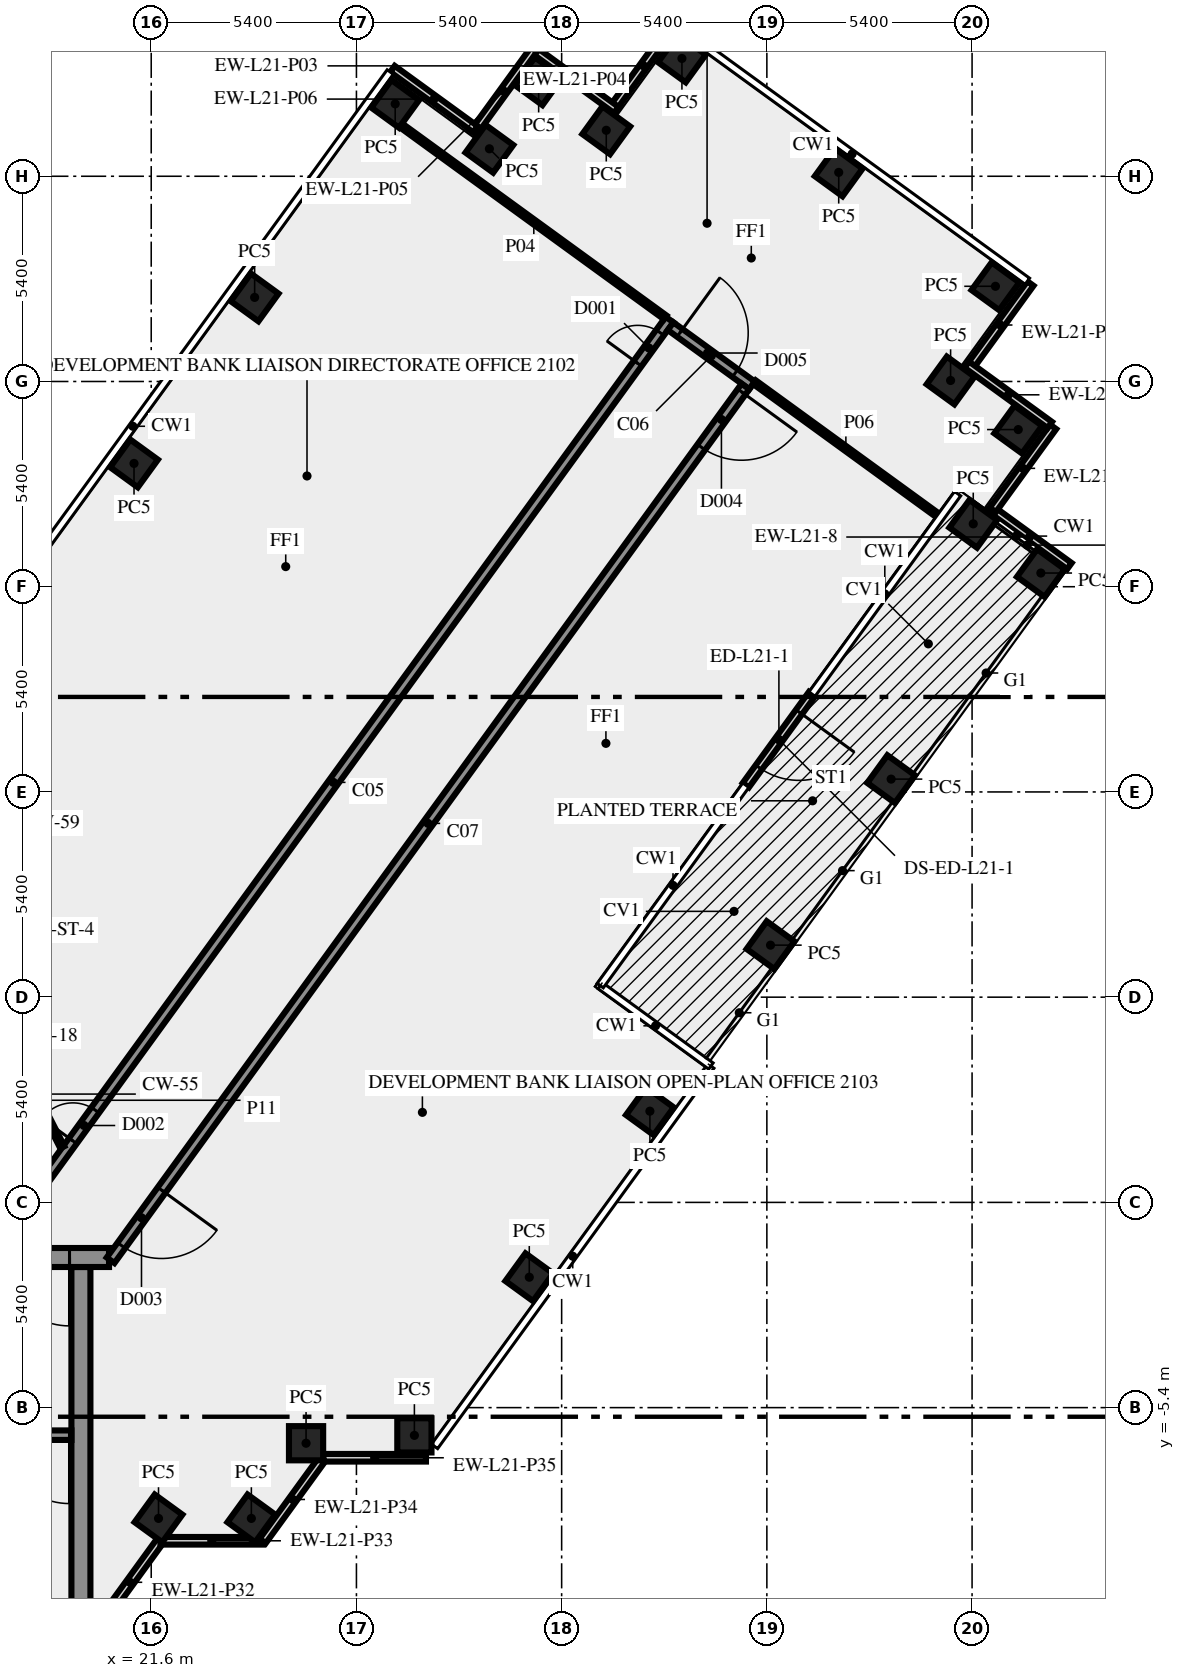
"""IFC4 building model, lengths in metres.
Left out: names, types, materials, properties, quantities, classifications, styles, units other than length and angle.
Written with IfcOpenShell. Run it as: python <this file> out.ifc"""

import sys

from ifc_helpers import new_model, si_unit, direction, frame, frame_2d, origin, origin_2d, place, context, subcontext, project, spatial, rectangle, extrude, element, fill, save


model = new_model("IFC4")
c1 = context("Model", 3, precision=1e-05, world=origin(), true_north=direction((0.0, 1.0)))
c2 = subcontext(c1, "Body", "Model", "MODEL_VIEW")
j1 = project(units=[si_unit("LENGTHUNIT", "METRE"), si_unit("PLANEANGLEUNIT", "RADIAN")], contexts=[c1])
p1 = place(None, origin())
s1 = spatial("IfcSite", under=j1, at=p1, CompositionType="ELEMENT")
p2 = place(p1, origin())
s2 = spatial("IfcBuilding", under=s1, at=p2, CompositionType="ELEMENT")
p3 = place(p2, frame((0.0, 0.0, 93.0)))
s3 = spatial("IfcBuildingStorey", under=s2, at=p3, CompositionType="ELEMENT", Elevation=93.0)
for number, where, z_axis, x_axis in (
    (1, (21.792, -8.315, 0.0), (0.0, 0.0, 1.0), (0.588, 0.809, 0.0)),
    (2, (24.235, -8.315, 0.0), (0.0, 0.0, 1.0), (0.588, 0.809, 0.0)),
    (3, (25.674, -6.337, 0.0), (0.0, 0.0, 1.0), (1.0, 0.0, 0.0)),
    (4, (28.525, -6.13, 0.0), (0.0, 0.0, 1.0), (1.0, 0.0, 0.0)),
    (5, (31.548, -1.969, 0.0), (0.0, 0.0, 1.0), (0.588, 0.809, 0.0)),
    (6, (34.722, 2.4, 0.0), (0.0, 0.0, 1.0), (0.588, 0.809, 0.0)),
    (7, (37.896, 6.769, 0.0), (0.0, 0.0, 1.0), (0.588, 0.809, 0.0)),
    (8, (41.07, 11.137, 0.0), (0.0, 0.0, 1.0), (0.588, 0.809, 0.0)),
    (9, (45.01, 16.56, 0.0), (0.0, 0.0, 1.0), (0.588, 0.809, 0.0)),
    (10, (43.231, 17.854, 0.0), (0.0, 0.0, 1.0), (0.588, 0.809, 0.0)),
    (11, (44.415, 20.335, 0.0), (0.0, 0.0, 1.0), (0.588, 0.809, 0.0)),
    (12, (42.635, 21.626, 0.0), (0.0, 0.0, 1.0), (-0.809, 0.588, 0.0)),
    (13, (43.815, 24.105, 0.0), (0.0, 0.0, 1.0), (-0.809, 0.588, 0.0)),
    (14, (39.691, 27.102, 0.0), (0.0, 0.0, 1.0), (-0.809, 0.588, 0.0)),
    (15, (35.565, 30.1, 0.0), (0.0, 0.0, 1.0), (-0.588, -0.809, 0.0)),
    (16, (33.574, 28.209, 0.0), (0.0, 0.0, 1.0), (-0.809, 0.588, 0.0)),
    (17, (31.795, 29.5, 0.0), (0.0, 0.0, 1.0), (-0.588, -0.809, 0.0)),
    (18, (30.499, 27.723, 0.0), (0.0, 0.0, 1.0), (-0.809, 0.588, 0.0)),
    (19, (28.02, 28.905, 0.0), (0.0, 0.0, 1.0), (-0.809, 0.588, 0.0)),
    (20, (24.321, 23.812, 0.0), (0.0, 0.0, 1.0), (-0.588, -0.809, 0.0)),
    (21, (21.147, 19.444, 0.0), (0.0, 0.0, 1.0), (-0.588, -0.809, 0.0)),
):
    element("IfcColumn", number, at=place(p3, frame(where, z_axis=z_axis, x_axis=x_axis)), inside=s3, PredefinedType="COLUMN", context=c2, shape_type="SweptSolid", body=[
        extrude(rectangle(XDim=0.9, YDim=0.9, at=origin_2d()), origin(), (0.0, 0.0, 1.0), 3.65),
    ])
for number, where, z_axis, x_axis in (
    (22, (43.149, 21.994, 0.0), (0.0, 0.0, 1.0), (0.588, 0.809, 0.0)),
    (23, (35.351, 30.997, 0.0), (0.0, 0.0, 1.0), (-0.588, -0.809, 0.0)),
    (24, (33.838, 28.744, 0.0), (0.0, 0.0, 1.0), (-0.809, 0.588, 0.0)),
    (25, (31.67, 30.333, 0.0), (0.0, 0.0, 1.0), (-0.588, -0.809, 0.0)),
    (26, (30.133, 28.237, 0.0), (0.0, 0.0, 1.0), (-0.809, 0.588, 0.0)),
):
    element("IfcWall", number, at=place(p3, frame(where, z_axis=z_axis, x_axis=x_axis)), inside=s3, PredefinedType="SOLIDWALL", context=c2, shape_type="SweptSolid", body=[
        extrude(rectangle(XDim=2.7, YDim=0.2, at=frame_2d((1.35, 0.0))), origin(), (0.0, 0.0, 1.0), 3.65),
    ])
p4 = place(p3, frame((20.253, -11.083, 0.0), z_axis=(0.0, 0.0, 1.0), x_axis=(0.587766567315, 0.809030569476, 0.0)))
e27 = element("IfcWall", 27, at=p4, inside=s3, PredefinedType="SOLIDWALL", context=c2, shape_type="SweptSolid", body=[
    extrude(rectangle(XDim=2.688, YDim=0.2, at=frame_2d((1.344, 0.0))), origin(), (0.0, 0.0, 1.0), 3.65),
])
p5 = place(p3, frame((21.843, -8.904, 0.0), z_axis=(0.0, 0.0, 1.0), x_axis=(1.0, 0.0, 0.0)))
e28 = element("IfcWall", 28, at=p5, inside=s3, PredefinedType="SOLIDWALL", context=c2, shape_type="SweptSolid", body=[
    extrude(rectangle(XDim=2.7, YDim=0.2, at=frame_2d((1.35, 0.0))), origin(), (0.0, 0.0, 1.0), 3.65),
])
p6 = place(p3, frame((24.533, -8.909, 0.0), z_axis=(0.0, 0.0, 1.0), x_axis=(0.587720002413, 0.809064397168, 0.0)))
e29 = element("IfcWall", 29, at=p6, inside=s3, PredefinedType="SOLIDWALL", context=c2, shape_type="SweptSolid", body=[
    extrude(rectangle(XDim=2.7, YDim=0.2, at=frame_2d((1.35, 0.0))), origin(), (0.0, 0.0, 1.0), 3.65),
])
p7 = place(p3, frame((26.13, -6.719, 0.0), z_axis=(0.0, 0.0, 1.0), x_axis=(1.0, 0.0, 0.0)))
e30 = element("IfcWall", 30, at=p7, inside=s3, PredefinedType="SOLIDWALL", context=c2, shape_type="SweptSolid", body=[
    extrude(rectangle(XDim=2.7, YDim=0.2, at=frame_2d((1.35, 0.0))), origin(), (0.0, 0.0, 1.0), 3.65),
])
p8 = place(p3, frame((38.988, 13.375, 0.0), z_axis=(0.0, 0.0, 1.0), x_axis=(-0.587735577821, -0.809053082661, 0.0)))
e31 = element("IfcWall", 31, at=p8, inside=s3, PredefinedType="SOLIDWALL", context=c2, shape_type="SweptSolid", body=[
    extrude(rectangle(XDim=2.963, YDim=0.2, at=frame_2d((1.481, 0.0))), origin(), (0.0, 0.0, 1.0), 3.65),
])
p9 = place(p8, frame((0.582, 0.0, 0.0)))
e32 = element("IfcOpeningElement", 32, at=p9, cuts=e31, PredefinedType="OPENING", context=c2, shape_type="SweptSolid", body=[
    extrude(rectangle(XDim=1.8, YDim=2.4, at=frame_2d((0.9, 1.2))), frame((0.0, 0.11, 0.0), z_axis=(0.0, -1.0, 0.0), x_axis=(1.0, 0.0, 0.0)), (0.0, 0.0, 1.0), 0.22),
])
p10 = place(p3, frame((45.761, 16.743, 0.0), z_axis=(0.0, 0.0, 1.0), x_axis=(-0.808979656733, 0.587836639716, 0.0)))
e33 = element("IfcWall", 33, at=p10, inside=s3, PredefinedType="SOLIDWALL", context=c2, shape_type="SweptSolid", body=[
    extrude(rectangle(XDim=2.6, YDim=0.2, at=frame_2d((1.3, 0.0))), origin(), (0.0, 0.0, 1.0), 3.65),
])
for number, where, z_axis, x_axis in (
    (34, (43.746, 18.223, 0.0), (0.0, 0.0, 1.0), (0.588, 0.809, 0.0)),
    (35, (45.245, 20.456, 0.0), (0.0, 0.0, 1.0), (-0.809, 0.588, 0.0)),
):
    element("IfcWall", number, at=place(p3, frame(where, z_axis=z_axis, x_axis=x_axis)), inside=s3, PredefinedType="SOLIDWALL", context=c2, shape_type="SweptSolid", body=[
        extrude(rectangle(XDim=2.7, YDim=0.2, at=frame_2d((1.35, 0.0))), origin(), (0.0, 0.0, 1.0), 3.65),
    ])
p11 = place(p3, frame((19.75, -10.5, 0.0), z_axis=(0.0, 0.0, 1.0), x_axis=(0.0, 1.0, 0.0)))
e36 = element("IfcWall", 36, at=p11, inside=s3, PredefinedType="SHEAR", context=c2, shape_type="SweptSolid", body=[
    extrude(rectangle(XDim=8.8, YDim=0.5, at=frame_2d((4.4, 0.0))), origin(), (0.0, 0.0, 1.0), 3.65),
])
p12 = place(p3, frame((19.5, -6.125, 0.0), z_axis=(0.0, 0.0, 1.0), x_axis=(-1.0, 0.0, 0.0)))
e37 = element("IfcWall", 37, at=p12, inside=s3, PredefinedType="SHEAR", context=c2, shape_type="SweptSolid", body=[
    extrude(rectangle(XDim=8.05, YDim=0.25, at=frame_2d((4.025, 0.0))), origin(), (0.0, 0.0, 1.0), 3.65),
])
p13 = place(p12, frame((0.05, 0.0, 0.0)))
e38 = element("IfcOpeningElement", 38, at=p13, cuts=e37, PredefinedType="OPENING", context=c2, shape_type="SweptSolid", body=[
    extrude(rectangle(XDim=1.8, YDim=2.1, at=frame_2d((0.9, 1.05))), frame((0.0, 0.135, 0.0), z_axis=(0.0, -1.0, 0.0), x_axis=(1.0, 0.0, 0.0)), (0.0, 0.0, 1.0), 0.27),
])
p14 = place(p3, frame((20.49, -1.45, 0.0), z_axis=(0.0, 0.0, 1.0), x_axis=(-1.0, 0.0, 0.0)))
e39 = element("IfcWall", 39, at=p14, inside=s3, PredefinedType="SHEAR", context=c2, shape_type="SweptSolid", body=[
    extrude(rectangle(XDim=40.98, YDim=0.5, at=frame_2d((20.49, 0.0))), origin(), (0.0, 0.0, 1.0), 3.65),
])
p15 = place(p14, frame((38.14, 0.0, 0.0)))
e40 = element("IfcOpeningElement", 40, at=p15, cuts=e39, PredefinedType="OPENING", context=c2, shape_type="SweptSolid", body=[
    extrude(rectangle(XDim=1.8, YDim=2.1, at=frame_2d((0.9, 1.05))), frame((0.0, 0.26, 0.0), z_axis=(0.0, -1.0, 0.0), x_axis=(1.0, 0.0, 0.0)), (0.0, 0.0, 1.0), 0.52),
])
p16 = place(p14, frame((35.89, 0.0, 0.0)))
e41 = element("IfcOpeningElement", 41, at=p16, cuts=e39, PredefinedType="OPENING", context=c2, shape_type="SweptSolid", body=[
    extrude(rectangle(XDim=0.9, YDim=2.1, at=frame_2d((0.45, 1.05))), frame((0.0, 0.26, 0.0), z_axis=(0.0, -1.0, 0.0), x_axis=(1.0, 0.0, 0.0)), (0.0, 0.0, 1.0), 0.52),
])
p17 = place(p14, frame((32.94, 0.0, 0.0)))
e42 = element("IfcOpeningElement", 42, at=p17, cuts=e39, PredefinedType="OPENING", context=c2, shape_type="SweptSolid", body=[
    extrude(rectangle(XDim=0.9, YDim=2.1, at=frame_2d((0.45, 1.05))), frame((0.0, 0.26, 0.0), z_axis=(0.0, -1.0, 0.0), x_axis=(1.0, 0.0, 0.0)), (0.0, 0.0, 1.0), 0.52),
])
p18 = place(p14, frame((21.765, 0.0, 0.0)))
e43 = element("IfcOpeningElement", 43, at=p18, cuts=e39, PredefinedType="OPENING", context=c2, shape_type="SweptSolid", body=[
    extrude(rectangle(XDim=2.0, YDim=2.1, at=frame_2d((1.0, 1.05))), frame((0.0, 0.26, 0.0), z_axis=(0.0, -1.0, 0.0), x_axis=(1.0, 0.0, 0.0)), (0.0, 0.0, 1.0), 0.52),
])
p19 = place(p14, frame((7.14, 0.0, 0.0)))
e44 = element("IfcOpeningElement", 44, at=p19, cuts=e39, PredefinedType="OPENING", context=c2, shape_type="SweptSolid", body=[
    extrude(rectangle(XDim=0.9, YDim=2.1, at=frame_2d((0.45, 1.05))), frame((0.0, 0.26, 0.0), z_axis=(0.0, -1.0, 0.0), x_axis=(1.0, 0.0, 0.0)), (0.0, 0.0, 1.0), 0.52),
])
p20 = place(p14, frame((5.028, 0.0, 0.0)))
e45 = element("IfcOpeningElement", 45, at=p20, cuts=e39, PredefinedType="OPENING", context=c2, shape_type="SweptSolid", body=[
    extrude(rectangle(XDim=0.8, YDim=2.1, at=frame_2d((0.4, 1.05))), frame((0.0, 0.26, 0.0), z_axis=(0.0, -1.0, 0.0), x_axis=(1.0, 0.0, 0.0)), (0.0, 0.0, 1.0), 0.52),
])
p21 = place(p14, frame((3.452, 0.0, 0.0)))
e46 = element("IfcOpeningElement", 46, at=p21, cuts=e39, PredefinedType="OPENING", context=c2, shape_type="SweptSolid", body=[
    extrude(rectangle(XDim=0.8, YDim=2.1, at=frame_2d((0.4, 1.05))), frame((0.0, 0.26, 0.0), z_axis=(0.0, -1.0, 0.0), x_axis=(1.0, 0.0, 0.0)), (0.0, 0.0, 1.0), 0.52),
])
p22 = place(p14, frame((1.04, 0.0, 0.0)))
e47 = element("IfcOpeningElement", 47, at=p22, cuts=e39, PredefinedType="OPENING", context=c2, shape_type="SweptSolid", body=[
    extrude(rectangle(XDim=1.8, YDim=2.1, at=frame_2d((0.9, 1.05))), frame((0.0, 0.26, 0.0), z_axis=(0.0, -1.0, 0.0), x_axis=(1.0, 0.0, 0.0)), (0.0, 0.0, 1.0), 0.52),
])
p23 = place(p3, frame((17.545, -1.125, 0.0), z_axis=(0.0, 0.0, 1.0), x_axis=(0.587786330937, 0.809016210693, 0.0)))
e48 = element("IfcWall", 48, at=p23, inside=s3, PredefinedType="SOLIDWALL", context=c2, shape_type="SweptSolid", body=[
    extrude(rectangle(XDim=30.103, YDim=0.25, at=frame_2d((15.052, 0.0))), origin(), (0.0, 0.0, 1.0), 3.65),
])
p24 = place(p23, frame((28.679, 0.0, 0.0)))
e49 = element("IfcOpeningElement", 49, at=p24, cuts=e48, PredefinedType="OPENING", context=c2, shape_type="SweptSolid", body=[
    extrude(rectangle(XDim=1.0, YDim=2.1, at=frame_2d((0.5, 1.05))), frame((0.0, 0.135, 0.0), z_axis=(0.0, -1.0, 0.0), x_axis=(1.0, 0.0, 0.0)), (0.0, 0.0, 1.0), 0.27),
])
p25 = place(p23, frame((3.391, 0.0, 0.0)))
e50 = element("IfcOpeningElement", 50, at=p25, cuts=e48, PredefinedType="OPENING", context=c2, shape_type="SweptSolid", body=[
    extrude(rectangle(XDim=1.0, YDim=2.1, at=frame_2d((0.5, 1.05))), frame((0.0, 0.135, 0.0), z_axis=(0.0, -1.0, 0.0), x_axis=(1.0, 0.0, 0.0)), (0.0, 0.0, 1.0), 0.27),
])
p26 = place(p3, frame((35.267, 23.054, 0.0), z_axis=(0.0, 0.0, 1.0), x_axis=(0.809038743598, -0.587755315891, 0.0)))
e51 = element("IfcWall", 51, at=p26, inside=s3, PredefinedType="SOLIDWALL", context=c2, shape_type="SweptSolid", body=[
    extrude(rectangle(XDim=2.65, YDim=0.25, at=frame_2d((1.325, 0.0))), origin(), (0.0, 0.0, 1.0), 3.65),
])
p27 = place(p26, frame((0.3, 0.0, 0.0)))
e52 = element("IfcOpeningElement", 52, at=p27, cuts=e51, PredefinedType="OPENING", context=c2, shape_type="SweptSolid", body=[
    extrude(rectangle(XDim=1.8, YDim=2.1, at=frame_2d((0.9, 1.05))), frame((0.0, 0.135, 0.0), z_axis=(0.0, -1.0, 0.0), x_axis=(1.0, 0.0, 0.0)), (0.0, 0.0, 1.0), 0.27),
])
p28 = place(p3, frame((37.236, 21.469, 0.0), z_axis=(0.0, 0.0, 1.0), x_axis=(-0.58778344073, -0.809018310549, 0.0)))
e53 = element("IfcWall", 53, at=p28, inside=s3, PredefinedType="SOLIDWALL", context=c2, shape_type="SweptSolid", body=[
    extrude(rectangle(XDim=28.42, YDim=0.25, at=frame_2d((14.21, 0.0))), origin(), (0.0, 0.0, 1.0), 3.65),
])
p29 = place(p28, frame((26.137, 0.0, 0.0)))
e54 = element("IfcOpeningElement", 54, at=p29, cuts=e53, PredefinedType="OPENING", context=c2, shape_type="SweptSolid", body=[
    extrude(rectangle(XDim=1.8, YDim=2.1, at=frame_2d((0.9, 1.05))), frame((0.0, 0.135, 0.0), z_axis=(0.0, -1.0, 0.0), x_axis=(1.0, 0.0, 0.0)), (0.0, 0.0, 1.0), 0.27),
])
p30 = place(p28, frame((0.175, 0.0, 0.0)))
e55 = element("IfcOpeningElement", 55, at=p30, cuts=e53, PredefinedType="OPENING", context=c2, shape_type="SweptSolid", body=[
    extrude(rectangle(XDim=1.8, YDim=2.1, at=frame_2d((0.9, 1.05))), frame((0.0, 0.135, 0.0), z_axis=(0.0, -1.0, 0.0), x_axis=(1.0, 0.0, 0.0)), (0.0, 0.0, 1.0), 0.27),
])
p31 = place(p3, frame((35.126, 23.286, 0.0), z_axis=(0.0, 0.0, 1.0), x_axis=(-0.809022465264, 0.587777722186, 0.0)))
e56 = element("IfcWall", 56, at=p31, inside=s3, PredefinedType="PARTITIONING", context=c2, shape_type="SweptSolid", body=[
    extrude(rectangle(XDim=8.55, YDim=0.12, at=frame_2d((4.275, 0.0))), origin(), (0.0, 0.0, 1.0), 3.65),
])
p32 = place(p3, frame((42.286, 18.084, 0.0), z_axis=(0.0, 0.0, 1.0), x_axis=(-0.809021658133, 0.587778833127, 0.0)))
e57 = element("IfcWall", 57, at=p32, inside=s3, PredefinedType="PARTITIONING", context=c2, shape_type="SweptSolid", body=[
    extrude(rectangle(XDim=5.95, YDim=0.12, at=frame_2d((2.975, 0.0))), origin(), (0.0, 0.0, 1.0), 3.65),
])
p33 = place(p3, frame((18.0, 3.925, 0.0), z_axis=(0.0, 0.0, 1.0), x_axis=(0.453950796792, -0.891026752736, 0.0)))
e58 = element("IfcWall", 58, at=p33, inside=s3, PredefinedType="PARTITIONING", context=c2, shape_type="SweptSolid", body=[
    extrude(rectangle(XDim=2.778, YDim=0.12, at=frame_2d((1.389, 0.0))), origin(), (0.0, 0.0, 1.0), 3.65),
])
p34 = place(p9, origin())
e59 = element("IfcDoor", 59, at=p34, inside=s3, OperationType="DOUBLE_DOOR_SINGLE_SWING", PredefinedType="DOOR", context=c2, shape_type="SweptSolid", body=[
    extrude(rectangle(XDim=1.8, YDim=2.4, at=frame_2d((0.9, 1.2))), frame((0.0, 0.025, 0.0), z_axis=(0.0, -1.0, 0.0), x_axis=(1.0, 0.0, 0.0)), (0.0, 0.0, 1.0), 0.05),
])
fill(e32, e59)
p35 = place(p13, origin())
e60 = element("IfcDoor", 60, at=p35, inside=s3, OperationType="DOUBLE_DOOR_SINGLE_SWING", PredefinedType="DOOR", context=c2, shape_type="SweptSolid", body=[
    extrude(rectangle(XDim=1.8, YDim=2.1, at=frame_2d((0.9, 1.05))), frame((0.0, 0.025, 0.0), z_axis=(0.0, -1.0, 0.0), x_axis=(1.0, 0.0, 0.0)), (0.0, 0.0, 1.0), 0.05),
])
fill(e38, e60)
p36 = place(p22, origin())
e61 = element("IfcDoor", 61, at=p36, inside=s3, OperationType="DOUBLE_DOOR_SINGLE_SWING", PredefinedType="DOOR", context=c2, shape_type="SweptSolid", body=[
    extrude(rectangle(XDim=1.8, YDim=2.1, at=frame_2d((0.9, 1.05))), frame((0.0, 0.025, 0.0), z_axis=(0.0, -1.0, 0.0), x_axis=(1.0, 0.0, 0.0)), (0.0, 0.0, 1.0), 0.05),
])
fill(e47, e61)
p37 = place(p24, origin())
e62 = element("IfcDoor", 62, at=p37, inside=s3, OperationType="SINGLE_SWING_RIGHT", PredefinedType="DOOR", context=c2, shape_type="SweptSolid", body=[
    extrude(rectangle(XDim=1.0, YDim=2.1, at=frame_2d((0.5, 1.05))), frame((0.0, 0.025, 0.0), z_axis=(0.0, -1.0, 0.0), x_axis=(1.0, 0.0, 0.0)), (0.0, 0.0, 1.0), 0.05),
])
fill(e49, e62)
p38 = place(p25, origin())
e63 = element("IfcDoor", 63, at=p38, inside=s3, OperationType="SINGLE_SWING_LEFT", PredefinedType="DOOR", context=c2, shape_type="SweptSolid", body=[
    extrude(rectangle(XDim=1.0, YDim=2.1, at=frame_2d((0.5, 1.05))), frame((0.0, 0.025, 0.0), z_axis=(0.0, -1.0, 0.0), x_axis=(1.0, 0.0, 0.0)), (0.0, 0.0, 1.0), 0.05),
])
fill(e50, e63)
p39 = place(p29, origin())
e64 = element("IfcDoor", 64, at=p39, inside=s3, OperationType="DOUBLE_DOOR_SINGLE_SWING", PredefinedType="DOOR", context=c2, shape_type="SweptSolid", body=[
    extrude(rectangle(XDim=1.8, YDim=2.1, at=frame_2d((0.9, 1.05))), frame((0.0, 0.025, 0.0), z_axis=(0.0, -1.0, 0.0), x_axis=(1.0, 0.0, 0.0)), (0.0, 0.0, 1.0), 0.05),
])
fill(e54, e64)
p40 = place(p30, origin())
e65 = element("IfcDoor", 65, at=p40, inside=s3, OperationType="DOUBLE_DOOR_SINGLE_SWING", PredefinedType="DOOR", context=c2, shape_type="SweptSolid", body=[
    extrude(rectangle(XDim=1.8, YDim=2.1, at=frame_2d((0.9, 1.05))), frame((0.0, 0.025, 0.0), z_axis=(0.0, -1.0, 0.0), x_axis=(1.0, 0.0, 0.0)), (0.0, 0.0, 1.0), 0.05),
])
fill(e55, e65)
p41 = place(p27, origin())
e66 = element("IfcDoor", 66, at=p41, inside=s3, OperationType="DOUBLE_DOOR_SINGLE_SWING", PredefinedType="DOOR", context=c2, shape_type="SweptSolid", body=[
    extrude(rectangle(XDim=1.8, YDim=2.1, at=frame_2d((0.9, 1.05))), frame((0.0, 0.025, 0.0), z_axis=(0.0, -1.0, 0.0), x_axis=(1.0, 0.0, 0.0)), (0.0, 0.0, 1.0), 0.05),
])
fill(e52, e66)
save(model, sys.argv[1])
